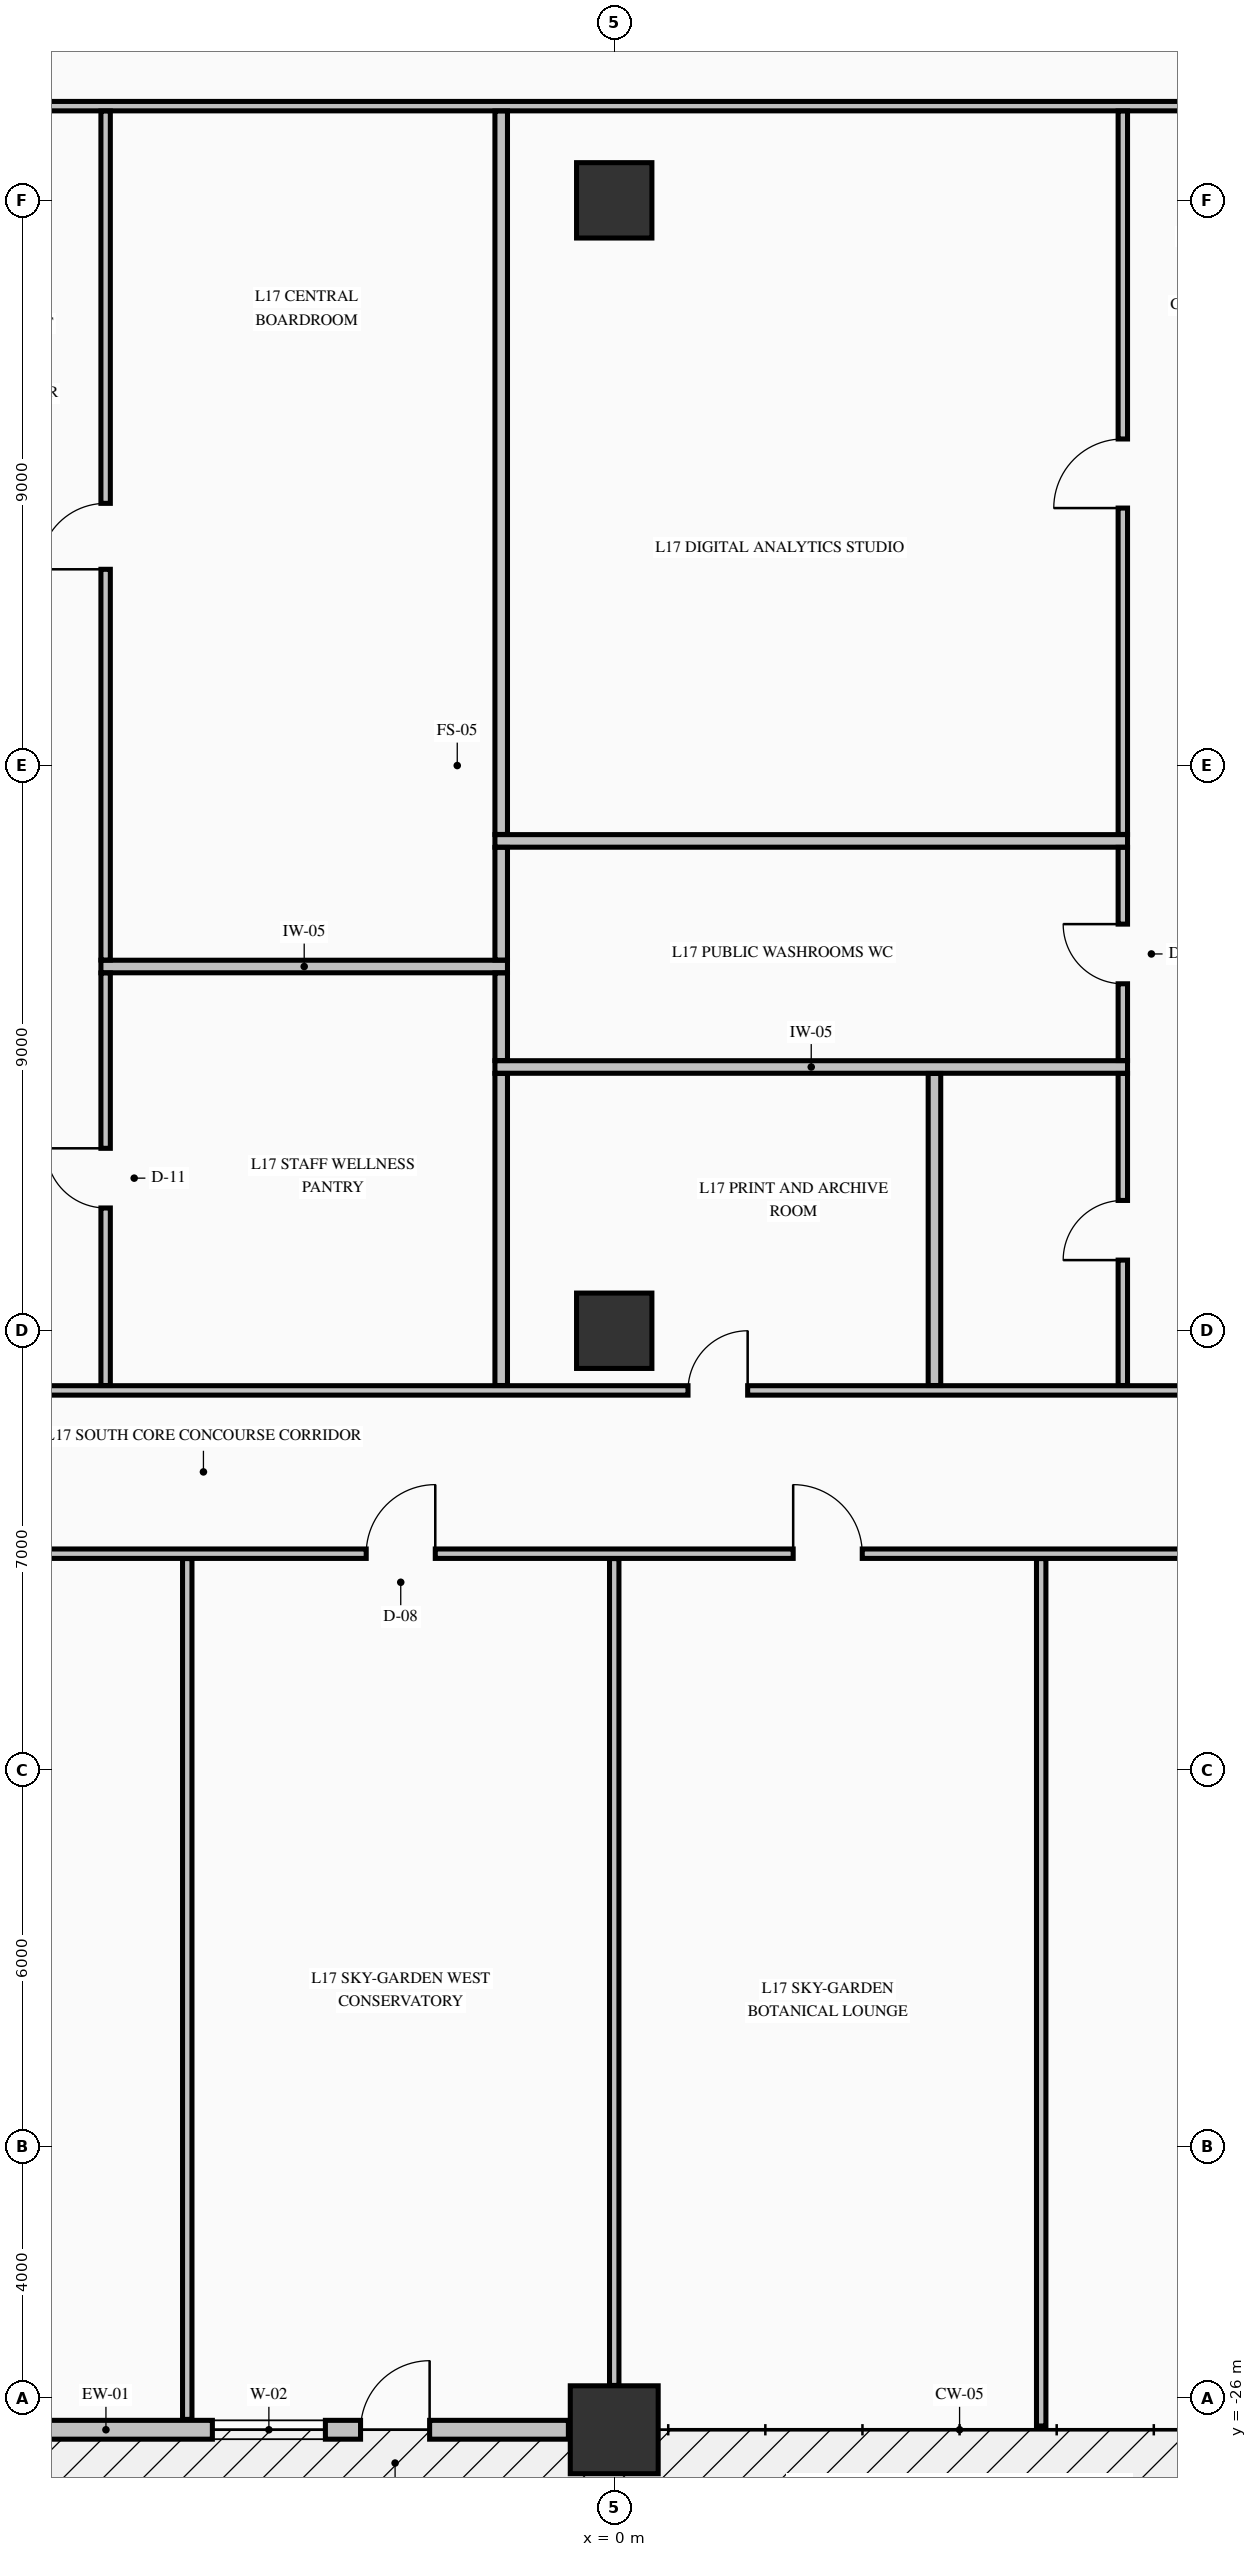
"""IFC4 building model, lengths in metres.
Left out: names, types, materials, properties, quantities, classifications, styles, units other than length and angle.
Written with IfcOpenShell. Run it as: python <this file> out.ifc"""

import sys

from ifc_helpers import new_model, si_unit, direction, frame, frame_2d, origin, origin_2d, place, context, subcontext, project, spatial, rectangle, extrude, element, fill, save


model = new_model("IFC4")
c1 = context("Model", 3, precision=1e-05, world=origin(), true_north=direction((0.0, 1.0)))
c2 = subcontext(c1, "Body", "Model", "MODEL_VIEW")
j1 = project(units=[si_unit("LENGTHUNIT", "METRE"), si_unit("PLANEANGLEUNIT", "RADIAN")], contexts=[c1])
p1 = place(None, origin())
s1 = spatial("IfcSite", under=j1, at=p1, CompositionType="ELEMENT")
p2 = place(p1, origin())
s2 = spatial("IfcBuilding", under=s1, at=p2, CompositionType="ELEMENT")
p3 = place(p2, frame((0.0, 0.0, 71.47)))
s3 = spatial("IfcBuildingStorey", under=s2, at=p3, CompositionType="ELEMENT", Elevation=71.47)
p4 = place(p3, frame((0.0, -26.5, -0.325), z_axis=(0.0, 0.0, 1.0), x_axis=(1.0, 0.0, 0.0)))
e1 = element("IfcColumn", 1, at=p4, inside=s3, PredefinedType="COLUMN", context=c2, shape_type="SweptSolid", body=[
    extrude(rectangle(XDim=1.4, YDim=1.4, at=origin_2d()), origin(), (0.0, 0.0, 1.0), 3.645),
])
for number, where, z_axis, x_axis in (
    (2, (0.0, -9.0, -0.325), (0.0, 0.0, 1.0), (1.0, 0.0, 0.0)),
    (3, (0.0, 9.0, -0.325), (0.0, 0.0, 1.0), (1.0, 0.0, 0.0)),
):
    element("IfcColumn", number, at=place(p3, frame(where, z_axis=z_axis, x_axis=x_axis)), inside=s3, PredefinedType="COLUMN", context=c2, shape_type="SweptSolid", body=[
        extrude(rectangle(XDim=1.2, YDim=1.2, at=origin_2d()), origin(), (0.0, 0.0, 1.0), 3.645),
    ])
p5 = place(p3, frame((-10.27, -26.5, 0.0), z_axis=(0.0, 0.0, 1.0), x_axis=(1.0, 0.0, 0.0)))
e4 = element("IfcWall", 4, at=p5, inside=s3, PredefinedType="STANDARD", context=c2, shape_type="SweptSolid", body=[
    extrude(rectangle(XDim=9.54, YDim=0.3, at=frame_2d((4.77, 0.0))), origin(), (0.0, 0.0, 1.0), 2.712),
])
p6 = place(p5, frame((6.23, 0.0, 0.0)))
e5 = element("IfcOpeningElement", 5, at=p6, cuts=e4, PredefinedType="OPENING", context=c2, shape_type="SweptSolid", body=[
    extrude(rectangle(XDim=1.1, YDim=2.15, at=frame_2d((0.55, 1.075))), frame((0.0, 0.16, 0.0), z_axis=(0.0, -1.0, 0.0), x_axis=(1.0, 0.0, 0.0)), (0.0, 0.0, 1.0), 0.32),
])
p7 = place(p5, frame((3.87, 0.0, 0.78)))
e6 = element("IfcOpeningElement", 6, at=p7, cuts=e4, PredefinedType="OPENING", context=c2, shape_type="SweptSolid", body=[
    extrude(rectangle(XDim=1.8, YDim=1.72, at=frame_2d((0.9, 0.86))), frame((0.0, 0.16, 0.0), z_axis=(0.0, -1.0, 0.0), x_axis=(1.0, 0.0, 0.0)), (0.0, 0.0, 1.0), 0.32),
])
p8 = place(p3, frame((-28.835, -12.55, 0.0), z_axis=(0.0, 0.0, 1.0), x_axis=(1.0, 0.0, 0.0)))
e7 = element("IfcWall", 7, at=p8, inside=s3, PredefinedType="PARTITIONING", context=c2, shape_type="SweptSolid", body=[
    extrude(rectangle(XDim=52.67, YDim=0.15, at=frame_2d((26.335, 0.0))), origin(), (0.0, 0.0, 1.0), 3.32),
])
p9 = place(p8, frame((14.985, 0.0, 0.0)))
e8 = element("IfcOpeningElement", 8, at=p9, cuts=e7, PredefinedType="OPENING", context=c2, shape_type="SweptSolid", body=[
    extrude(rectangle(XDim=1.1, YDim=2.15, at=frame_2d((0.55, 1.075))), frame((0.0, 0.085, 0.0), z_axis=(0.0, -1.0, 0.0), x_axis=(1.0, 0.0, 0.0)), (0.0, 0.0, 1.0), 0.17),
])
p10 = place(p8, frame((24.885, 0.0, 0.0)))
e9 = element("IfcOpeningElement", 9, at=p10, cuts=e7, PredefinedType="OPENING", context=c2, shape_type="SweptSolid", body=[
    extrude(rectangle(XDim=1.1, YDim=2.15, at=frame_2d((0.55, 1.075))), frame((0.0, 0.085, 0.0), z_axis=(0.0, -1.0, 0.0), x_axis=(1.0, 0.0, 0.0)), (0.0, 0.0, 1.0), 0.17),
])
p11 = place(p8, frame((31.685, 0.0, 0.0)))
e10 = element("IfcOpeningElement", 10, at=p11, cuts=e7, PredefinedType="OPENING", context=c2, shape_type="SweptSolid", body=[
    extrude(rectangle(XDim=1.1, YDim=2.15, at=frame_2d((0.55, 1.075))), frame((0.0, 0.085, 0.0), z_axis=(0.0, -1.0, 0.0), x_axis=(1.0, 0.0, 0.0)), (0.0, 0.0, 1.0), 0.17),
])
p12 = place(p8, frame((41.585, 0.0, 0.0)))
e11 = element("IfcOpeningElement", 11, at=p12, cuts=e7, PredefinedType="OPENING", context=c2, shape_type="SweptSolid", body=[
    extrude(rectangle(XDim=1.1, YDim=2.15, at=frame_2d((0.55, 1.075))), frame((0.0, 0.085, 0.0), z_axis=(0.0, -1.0, 0.0), x_axis=(1.0, 0.0, 0.0)), (0.0, 0.0, 1.0), 0.17),
])
p13 = place(p3, frame((-10.394, -9.95, 0.0), z_axis=(0.0, 0.0, 1.0), x_axis=(1.0, 0.0, 0.0)))
e12 = element("IfcWall", 12, at=p13, inside=s3, PredefinedType="PARTITIONING", context=c2, shape_type="SweptSolid", body=[
    extrude(rectangle(XDim=20.788, YDim=0.15, at=frame_2d((10.394, 0.0))), origin(), (0.0, 0.0, 1.0), 3.32),
])
p14 = place(p13, frame((0.319, 0.0, 0.0)))
e13 = element("IfcOpeningElement", 13, at=p14, cuts=e12, PredefinedType="OPENING", context=c2, shape_type="SweptSolid", body=[
    extrude(rectangle(XDim=1.05, YDim=2.15, at=frame_2d((0.525, 1.075))), frame((0.0, 0.085, 0.0), z_axis=(0.0, -1.0, 0.0), x_axis=(1.0, 0.0, 0.0)), (0.0, 0.0, 1.0), 0.17),
])
p15 = place(p13, frame((19.419, 0.0, 0.0)))
e14 = element("IfcOpeningElement", 14, at=p15, cuts=e12, PredefinedType="OPENING", context=c2, shape_type="SweptSolid", body=[
    extrude(rectangle(XDim=1.05, YDim=2.15, at=frame_2d((0.525, 1.075))), frame((0.0, 0.085, 0.0), z_axis=(0.0, -1.0, 0.0), x_axis=(1.0, 0.0, 0.0)), (0.0, 0.0, 1.0), 0.17),
])
p16 = place(p13, frame((11.569, 0.0, 0.0)))
e15 = element("IfcOpeningElement", 15, at=p16, cuts=e12, PredefinedType="OPENING", context=c2, shape_type="SweptSolid", body=[
    extrude(rectangle(XDim=0.95, YDim=2.15, at=frame_2d((0.475, 1.075))), frame((0.0, 0.085, 0.0), z_axis=(0.0, -1.0, 0.0), x_axis=(1.0, 0.0, 0.0)), (0.0, 0.0, 1.0), 0.17),
])
p17 = place(p3, frame((-1.9, -4.8, 0.0), z_axis=(0.0, 0.0, 1.0), x_axis=(1.0, 0.0, 0.0)))
e16 = element("IfcWall", 16, at=p17, inside=s3, PredefinedType="PARTITIONING", context=c2, shape_type="SweptSolid", body=[
    extrude(rectangle(XDim=10.075, YDim=0.2, at=frame_2d((5.038, 0.0))), origin(), (0.0, 0.0, 1.0), 3.32),
])
p18 = place(p3, frame((-8.175, -3.2, 0.0), z_axis=(0.0, 0.0, 1.0), x_axis=(1.0, 0.0, 0.0)))
e17 = element("IfcWall", 17, at=p18, inside=s3, PredefinedType="PARTITIONING", context=c2, shape_type="SweptSolid", body=[
    extrude(rectangle(XDim=6.475, YDim=0.2, at=frame_2d((3.238, 0.0))), origin(), (0.0, 0.0, 1.0), 3.32),
])
p19 = place(p3, frame((-1.9, -1.2, 0.0), z_axis=(0.0, 0.0, 1.0), x_axis=(1.0, 0.0, 0.0)))
e18 = element("IfcWall", 18, at=p19, inside=s3, PredefinedType="PARTITIONING", context=c2, shape_type="SweptSolid", body=[
    extrude(rectangle(XDim=10.075, YDim=0.2, at=frame_2d((5.038, 0.0))), origin(), (0.0, 0.0, 1.0), 3.32),
])
p20 = place(p3, frame((-10.394, 10.5, 0.0), z_axis=(0.0, 0.0, 1.0), x_axis=(1.0, 0.0, 0.0)))
e19 = element("IfcWall", 19, at=p20, inside=s3, PredefinedType="PARTITIONING", context=c2, shape_type="SweptSolid", body=[
    extrude(rectangle(XDim=20.788, YDim=0.15, at=frame_2d((10.394, 0.0))), origin(), (0.0, 0.0, 1.0), 3.32),
])
p21 = place(p20, frame((0.319, 0.0, 0.0)))
e20 = element("IfcOpeningElement", 20, at=p21, cuts=e19, PredefinedType="OPENING", context=c2, shape_type="SweptSolid", body=[
    extrude(rectangle(XDim=1.05, YDim=2.15, at=frame_2d((0.525, 1.075))), frame((0.0, 0.085, 0.0), z_axis=(0.0, -1.0, 0.0), x_axis=(1.0, 0.0, 0.0)), (0.0, 0.0, 1.0), 0.17),
])
p22 = place(p20, frame((19.419, 0.0, 0.0)))
e21 = element("IfcOpeningElement", 21, at=p22, cuts=e19, PredefinedType="OPENING", context=c2, shape_type="SweptSolid", body=[
    extrude(rectangle(XDim=1.05, YDim=2.15, at=frame_2d((0.525, 1.075))), frame((0.0, 0.085, 0.0), z_axis=(0.0, -1.0, 0.0), x_axis=(1.0, 0.0, 0.0)), (0.0, 0.0, 1.0), 0.17),
])
p23 = place(p3, frame((-8.1, -9.872, 0.0), z_axis=(0.0, 0.0, 1.0), x_axis=(0.0, 1.0, 0.0)))
e22 = element("IfcWall", 22, at=p23, inside=s3, PredefinedType="PARTITIONING", context=c2, shape_type="SweptSolid", body=[
    extrude(rectangle(XDim=6.569, YDim=0.15, at=frame_2d((3.285, 0.0))), origin(), (0.0, 0.0, 1.0), 3.32),
])
p24 = place(p23, frame((2.827, 0.0, 0.0)))
e23 = element("IfcOpeningElement", 23, at=p24, cuts=e22, PredefinedType="OPENING", context=c2, shape_type="SweptSolid", body=[
    extrude(rectangle(XDim=0.95, YDim=2.15, at=frame_2d((0.475, 1.075))), frame((0.0, 0.085, 0.0), z_axis=(0.0, -1.0, 0.0), x_axis=(1.0, 0.0, 0.0)), (0.0, 0.0, 1.0), 0.17),
])
p25 = place(p3, frame((-8.1, -3.097, 0.0), z_axis=(0.0, 0.0, 1.0), x_axis=(0.0, 1.0, 0.0)))
e24 = element("IfcWall", 24, at=p25, inside=s3, PredefinedType="PARTITIONING", context=c2, shape_type="SweptSolid", body=[
    extrude(rectangle(XDim=13.519, YDim=0.15, at=frame_2d((6.76, 0.0))), origin(), (0.0, 0.0, 1.0), 3.32),
])
p26 = place(p25, frame((6.222, 0.0, 0.0)))
e25 = element("IfcOpeningElement", 25, at=p26, cuts=e24, PredefinedType="OPENING", context=c2, shape_type="SweptSolid", body=[
    extrude(rectangle(XDim=1.05, YDim=2.15, at=frame_2d((0.525, 1.075))), frame((0.0, 0.085, 0.0), z_axis=(0.0, -1.0, 0.0), x_axis=(1.0, 0.0, 0.0)), (0.0, 0.0, 1.0), 0.17),
])
p27 = place(p3, frame((-6.8, -26.335, 0.0), z_axis=(0.0, 0.0, 1.0), x_axis=(0.0, 1.0, 0.0)))
e26 = element("IfcWall", 26, at=p27, inside=s3, PredefinedType="PARTITIONING", context=c2, shape_type="SweptSolid", body=[
    extrude(rectangle(XDim=13.707, YDim=0.15, at=frame_2d((6.854, 0.0))), origin(), (0.0, 0.0, 1.0), 3.32),
])
p28 = place(p3, frame((-1.8, -9.872, 0.0), z_axis=(0.0, 0.0, 1.0), x_axis=(0.0, 1.0, 0.0)))
e27 = element("IfcWall", 27, at=p28, inside=s3, PredefinedType="PARTITIONING", context=c2, shape_type="SweptSolid", body=[
    extrude(rectangle(XDim=4.969, YDim=0.2, at=frame_2d((2.484, 0.0))), origin(), (0.0, 0.0, 1.0), 3.32),
])
p29 = place(p3, frame((-1.8, -4.697, 0.0), z_axis=(0.0, 0.0, 1.0), x_axis=(0.0, 1.0, 0.0)))
e28 = element("IfcWall", 28, at=p29, inside=s3, PredefinedType="PARTITIONING", context=c2, shape_type="SweptSolid", body=[
    extrude(rectangle(XDim=1.394, YDim=0.2, at=frame_2d((0.697, 0.0))), origin(), (0.0, 0.0, 1.0), 3.32),
])
p30 = place(p3, frame((-1.8, -3.097, 0.0), z_axis=(0.0, 0.0, 1.0), x_axis=(0.0, 1.0, 0.0)))
e29 = element("IfcWall", 29, at=p30, inside=s3, PredefinedType="PARTITIONING", context=c2, shape_type="SweptSolid", body=[
    extrude(rectangle(XDim=1.794, YDim=0.2, at=frame_2d((0.897, 0.0))), origin(), (0.0, 0.0, 1.0), 3.32),
])
p31 = place(p3, frame((-1.8, -1.097, 0.0), z_axis=(0.0, 0.0, 1.0), x_axis=(0.0, 1.0, 0.0)))
e30 = element("IfcWall", 30, at=p31, inside=s3, PredefinedType="PARTITIONING", context=c2, shape_type="SweptSolid", body=[
    extrude(rectangle(XDim=11.519, YDim=0.2, at=frame_2d((5.76, 0.0))), origin(), (0.0, 0.0, 1.0), 3.32),
])
p32 = place(p3, frame((0.0, -25.794, 0.0), z_axis=(0.0, 0.0, 1.0), x_axis=(0.0, 1.0, 0.0)))
e31 = element("IfcWall", 31, at=p32, inside=s3, PredefinedType="PARTITIONING", context=c2, shape_type="SweptSolid", body=[
    extrude(rectangle(XDim=13.166, YDim=0.15, at=frame_2d((6.583, 0.0))), origin(), (0.0, 0.0, 1.0), 3.32),
])
p33 = place(p3, frame((5.1, -9.872, 0.0), z_axis=(0.0, 0.0, 1.0), x_axis=(0.0, 1.0, 0.0)))
e32 = element("IfcWall", 32, at=p33, inside=s3, PredefinedType="PARTITIONING", context=c2, shape_type="SweptSolid", body=[
    extrude(rectangle(XDim=4.969, YDim=0.2, at=frame_2d((2.484, 0.0))), origin(), (0.0, 0.0, 1.0), 3.32),
])
p34 = place(p3, frame((6.8, -26.44, 0.0), z_axis=(0.0, 0.0, 1.0), x_axis=(0.0, 1.0, 0.0)))
e33 = element("IfcWall", 33, at=p34, inside=s3, PredefinedType="PARTITIONING", context=c2, shape_type="SweptSolid", body=[
    extrude(rectangle(XDim=13.812, YDim=0.15, at=frame_2d((6.906, 0.0))), origin(), (0.0, 0.0, 1.0), 3.32),
])
p35 = place(p3, frame((8.1, -9.872, 0.0), z_axis=(0.0, 0.0, 1.0), x_axis=(0.0, 1.0, 0.0)))
e34 = element("IfcWall", 34, at=p35, inside=s3, PredefinedType="PARTITIONING", context=c2, shape_type="SweptSolid", body=[
    extrude(rectangle(XDim=4.969, YDim=0.15, at=frame_2d((2.484, 0.0))), origin(), (0.0, 0.0, 1.0), 3.32),
])
p36 = place(p35, frame((1.997, 0.0, 0.0)))
e35 = element("IfcOpeningElement", 35, at=p36, cuts=e34, PredefinedType="OPENING", context=c2, shape_type="SweptSolid", body=[
    extrude(rectangle(XDim=0.95, YDim=2.15, at=frame_2d((0.475, 1.075))), frame((0.0, 0.085, 0.0), z_axis=(0.0, -1.0, 0.0), x_axis=(1.0, 0.0, 0.0)), (0.0, 0.0, 1.0), 0.17),
])
p37 = place(p3, frame((8.1, -4.697, 0.0), z_axis=(0.0, 0.0, 1.0), x_axis=(0.0, 1.0, 0.0)))
e36 = element("IfcWall", 36, at=p37, inside=s3, PredefinedType="PARTITIONING", context=c2, shape_type="SweptSolid", body=[
    extrude(rectangle(XDim=3.394, YDim=0.15, at=frame_2d((1.697, 0.0))), origin(), (0.0, 0.0, 1.0), 3.32),
])
p38 = place(p37, frame((1.222, 0.0, 0.0)))
e37 = element("IfcOpeningElement", 37, at=p38, cuts=e36, PredefinedType="OPENING", context=c2, shape_type="SweptSolid", body=[
    extrude(rectangle(XDim=0.95, YDim=2.15, at=frame_2d((0.475, 1.075))), frame((0.0, 0.085, 0.0), z_axis=(0.0, -1.0, 0.0), x_axis=(1.0, 0.0, 0.0)), (0.0, 0.0, 1.0), 0.17),
])
p39 = place(p3, frame((8.1, -1.097, 0.0), z_axis=(0.0, 0.0, 1.0), x_axis=(0.0, 1.0, 0.0)))
e38 = element("IfcWall", 38, at=p39, inside=s3, PredefinedType="PARTITIONING", context=c2, shape_type="SweptSolid", body=[
    extrude(rectangle(XDim=11.519, YDim=0.15, at=frame_2d((5.76, 0.0))), origin(), (0.0, 0.0, 1.0), 3.32),
])
p40 = place(p39, frame((5.197, 0.0, 0.0)))
e39 = element("IfcOpeningElement", 39, at=p40, cuts=e38, PredefinedType="OPENING", context=c2, shape_type="SweptSolid", body=[
    extrude(rectangle(XDim=1.1, YDim=2.15, at=frame_2d((0.55, 1.075))), frame((0.0, 0.085, 0.0), z_axis=(0.0, -1.0, 0.0), x_axis=(1.0, 0.0, 0.0)), (0.0, 0.0, 1.0), 0.17),
])
p41 = place(p6, origin())
e40 = element("IfcDoor", 40, at=p41, inside=s3, OperationType="SINGLE_SWING_RIGHT", PredefinedType="DOOR", context=c2, shape_type="SweptSolid", body=[
    extrude(rectangle(XDim=1.1, YDim=2.15, at=frame_2d((0.55, 1.075))), frame((0.0, 0.025, 0.0), z_axis=(0.0, -1.0, 0.0), x_axis=(1.0, 0.0, 0.0)), (0.0, 0.0, 1.0), 0.05),
])
fill(e5, e40)
p42 = place(p7, origin())
e41 = element("IfcWindow", 41, at=p42, inside=s3, PartitioningType="SINGLE_PANEL", PredefinedType="WINDOW", context=c2, shape_type="SweptSolid", body=[
    extrude(rectangle(XDim=1.8, YDim=1.72, at=frame_2d((0.9, 0.86))), frame((0.0, 0.03, 0.0), z_axis=(0.0, -1.0, 0.0), x_axis=(1.0, 0.0, 0.0)), (0.0, 0.0, 1.0), 0.06),
])
fill(e6, e41)
p43 = place(p10, origin())
e42 = element("IfcDoor", 42, at=p43, inside=s3, OperationType="SINGLE_SWING_RIGHT", PredefinedType="DOOR", context=c2, shape_type="SweptSolid", body=[
    extrude(rectangle(XDim=1.1, YDim=2.15, at=frame_2d((0.55, 1.075))), frame((0.0, 0.025, 0.0), z_axis=(0.0, -1.0, 0.0), x_axis=(1.0, 0.0, 0.0)), (0.0, 0.0, 1.0), 0.05),
])
fill(e9, e42)
p44 = place(p11, origin())
e43 = element("IfcDoor", 43, at=p44, inside=s3, OperationType="SINGLE_SWING_LEFT", PredefinedType="DOOR", context=c2, shape_type="SweptSolid", body=[
    extrude(rectangle(XDim=1.1, YDim=2.15, at=frame_2d((0.55, 1.075))), frame((0.0, 0.025, 0.0), z_axis=(0.0, -1.0, 0.0), x_axis=(1.0, 0.0, 0.0)), (0.0, 0.0, 1.0), 0.05),
])
fill(e10, e43)
p45 = place(p26, origin())
e44 = element("IfcDoor", 44, at=p45, inside=s3, OperationType="SINGLE_SWING_LEFT", PredefinedType="DOOR", context=c2, shape_type="SweptSolid", body=[
    extrude(rectangle(XDim=1.05, YDim=2.15, at=frame_2d((0.525, 1.075))), frame((0.0, 0.025, 0.0), z_axis=(0.0, -1.0, 0.0), x_axis=(1.0, 0.0, 0.0)), (0.0, 0.0, 1.0), 0.05),
])
fill(e25, e44)
p46 = place(p24, origin())
e45 = element("IfcDoor", 45, at=p46, inside=s3, OperationType="SINGLE_SWING_RIGHT", PredefinedType="DOOR", context=c2, shape_type="SweptSolid", body=[
    extrude(rectangle(XDim=0.95, YDim=2.15, at=frame_2d((0.475, 1.075))), frame((0.0, 0.025, 0.0), z_axis=(0.0, -1.0, 0.0), x_axis=(1.0, 0.0, 0.0)), (0.0, 0.0, 1.0), 0.05),
])
fill(e23, e45)
p47 = place(p40, origin())
e46 = element("IfcDoor", 46, at=p47, inside=s3, OperationType="SINGLE_SWING_LEFT", PredefinedType="DOOR", context=c2, shape_type="SweptSolid", body=[
    extrude(rectangle(XDim=1.1, YDim=2.15, at=frame_2d((0.55, 1.075))), frame((0.0, 0.025, 0.0), z_axis=(0.0, -1.0, 0.0), x_axis=(1.0, 0.0, 0.0)), (0.0, 0.0, 1.0), 0.05),
])
fill(e39, e46)
p48 = place(p38, origin())
e47 = element("IfcDoor", 47, at=p48, inside=s3, OperationType="SINGLE_SWING_RIGHT", PredefinedType="DOOR", context=c2, shape_type="SweptSolid", body=[
    extrude(rectangle(XDim=0.95, YDim=2.15, at=frame_2d((0.475, 1.075))), frame((0.0, 0.025, 0.0), z_axis=(0.0, -1.0, 0.0), x_axis=(1.0, 0.0, 0.0)), (0.0, 0.0, 1.0), 0.05),
])
fill(e37, e47)
p49 = place(p36, origin())
e48 = element("IfcDoor", 48, at=p49, inside=s3, OperationType="SINGLE_SWING_LEFT", PredefinedType="DOOR", context=c2, shape_type="SweptSolid", body=[
    extrude(rectangle(XDim=0.95, YDim=2.15, at=frame_2d((0.475, 1.075))), frame((0.0, 0.025, 0.0), z_axis=(0.0, -1.0, 0.0), x_axis=(1.0, 0.0, 0.0)), (0.0, 0.0, 1.0), 0.05),
])
fill(e35, e48)
p50 = place(p16, origin())
e49 = element("IfcDoor", 49, at=p50, inside=s3, OperationType="SINGLE_SWING_RIGHT", PredefinedType="DOOR", context=c2, shape_type="SweptSolid", body=[
    extrude(rectangle(XDim=0.95, YDim=2.15, at=frame_2d((0.475, 1.075))), frame((0.0, 0.025, 0.0), z_axis=(0.0, -1.0, 0.0), x_axis=(1.0, 0.0, 0.0)), (0.0, 0.0, 1.0), 0.05),
])
fill(e15, e49)
save(model, sys.argv[1])
